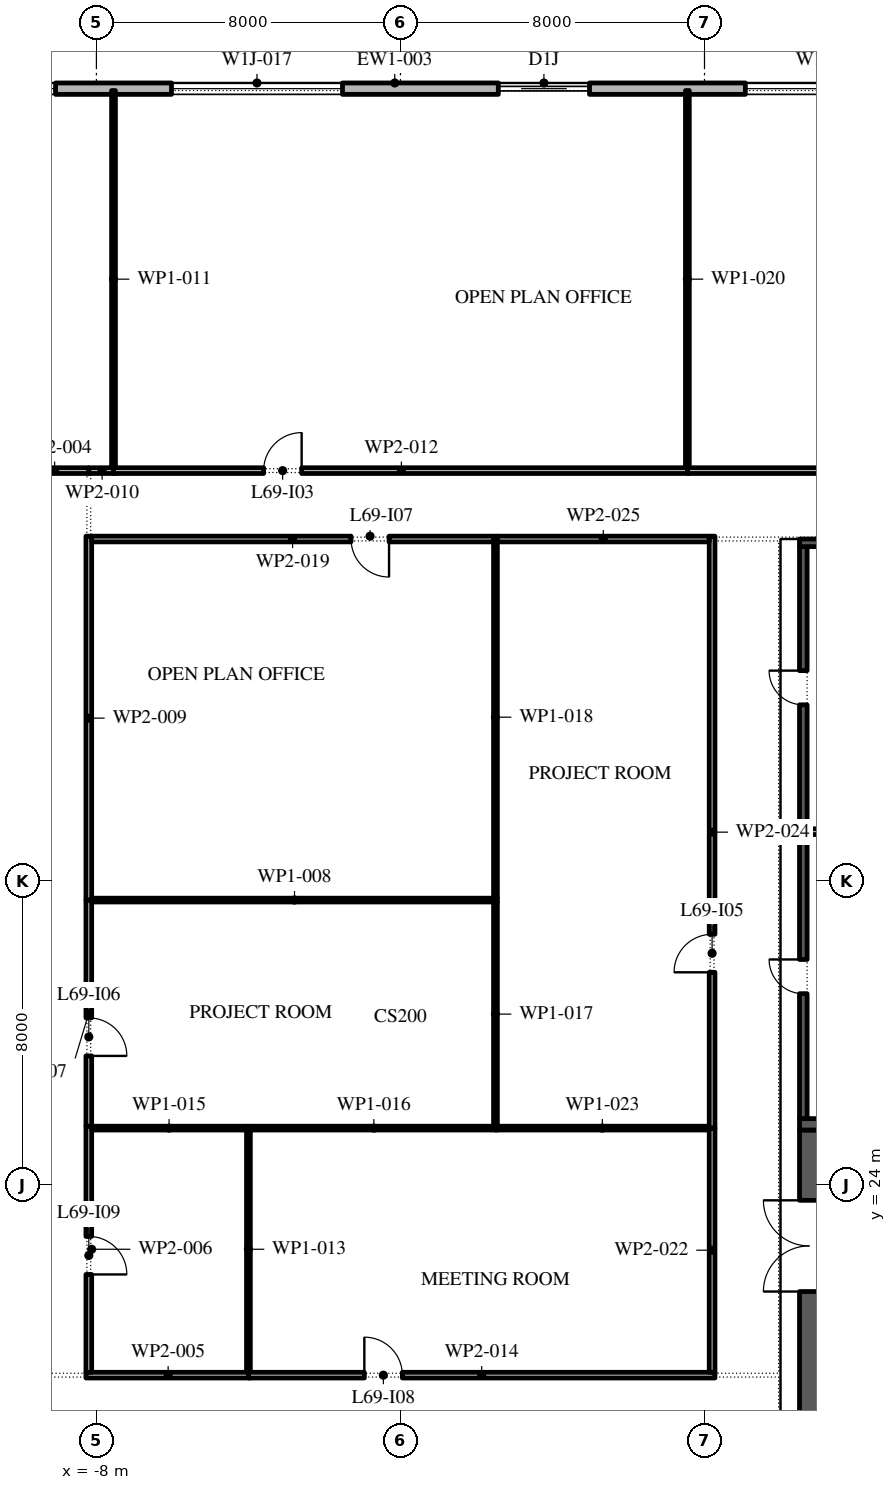
"""IFC4 building model, lengths in metres.
Left out: names, types, materials, properties, quantities, classifications, styles, units other than length and angle.
Written with IfcOpenShell. Run it as: python <this file> out.ifc"""

import sys

from ifc_helpers import new_model, si_unit, direction, frame, frame_2d, origin, place, context, subcontext, project, spatial, rectangle, extrude, element, fill, save


model = new_model("IFC4")
c1 = context("Model", 3, precision=1e-05, world=origin(), true_north=direction((0.0, 1.0)))
c2 = subcontext(c1, "Body", "Model", "MODEL_VIEW")
j1 = project(units=[si_unit("LENGTHUNIT", "METRE"), si_unit("PLANEANGLEUNIT", "RADIAN")], contexts=[c1])
p1 = place(None, origin())
s1 = spatial("IfcSite", under=j1, at=p1, CompositionType="ELEMENT")
p2 = place(p1, origin())
s2 = spatial("IfcBuilding", under=s1, at=p2, CompositionType="ELEMENT")
p3 = place(p2, frame((0.0, 0.0, 317.4)))
s3 = spatial("IfcBuildingStorey", under=s2, at=p3, CompositionType="ELEMENT", Elevation=317.4)
p4 = place(p3, frame((22.35, 52.85, 0.0), z_axis=(0.0, 0.0, 1.0), x_axis=(-1.0, 0.0, 0.0)))
e1 = element("IfcWall", 1, at=p4, inside=s3, PredefinedType="STANDARD", context=c2, shape_type="SweptSolid", body=[
    extrude(rectangle(XDim=45.0, YDim=0.3, at=frame_2d((22.5, 0.0))), origin(), (0.0, 0.0, 1.0), 4.0),
])
p5 = place(p4, frame((1.375, 0.0, 0.45)))
e2 = element("IfcOpeningElement", 2, at=p5, cuts=e1, PredefinedType="OPENING", context=c2, shape_type="SweptSolid", body=[
    extrude(rectangle(XDim=4.5, YDim=2.675, at=frame_2d((2.25, 1.337))), frame((0.0, 0.16, 0.0), z_axis=(0.0, -1.0, 0.0), x_axis=(1.0, 0.0, 0.0)), (0.0, 0.0, 1.0), 0.32),
])
p6 = place(p4, frame((8.775, 0.0, 0.45)))
e3 = element("IfcOpeningElement", 3, at=p6, cuts=e1, PredefinedType="OPENING", context=c2, shape_type="SweptSolid", body=[
    extrude(rectangle(XDim=4.5, YDim=2.675, at=frame_2d((2.25, 1.337))), frame((0.0, 0.16, 0.0), z_axis=(0.0, -1.0, 0.0), x_axis=(1.0, 0.0, 0.0)), (0.0, 0.0, 1.0), 0.32),
])
p7 = place(p4, frame((17.375, 0.0, 0.0)))
e4 = element("IfcOpeningElement", 4, at=p7, cuts=e1, PredefinedType="OPENING", context=c2, shape_type="SweptSolid", body=[
    extrude(rectangle(XDim=2.4, YDim=3.125, at=frame_2d((1.2, 1.562))), frame((0.0, 0.16, 0.0), z_axis=(0.0, -1.0, 0.0), x_axis=(1.0, 0.0, 0.0)), (0.0, 0.0, 1.0), 0.32),
])
p8 = place(p4, frame((23.875, 0.0, 0.45)))
e5 = element("IfcOpeningElement", 5, at=p8, cuts=e1, PredefinedType="OPENING", context=c2, shape_type="SweptSolid", body=[
    extrude(rectangle(XDim=4.5, YDim=2.675, at=frame_2d((2.25, 1.337))), frame((0.0, 0.16, 0.0), z_axis=(0.0, -1.0, 0.0), x_axis=(1.0, 0.0, 0.0)), (0.0, 0.0, 1.0), 0.32),
])
p9 = place(p4, frame((31.425, 0.0, 0.45)))
e6 = element("IfcOpeningElement", 6, at=p9, cuts=e1, PredefinedType="OPENING", context=c2, shape_type="SweptSolid", body=[
    extrude(rectangle(XDim=4.5, YDim=2.675, at=frame_2d((2.25, 1.337))), frame((0.0, 0.16, 0.0), z_axis=(0.0, -1.0, 0.0), x_axis=(1.0, 0.0, 0.0)), (0.0, 0.0, 1.0), 0.32),
])
p10 = place(p4, frame((38.975, 0.0, 0.45)))
e7 = element("IfcOpeningElement", 7, at=p10, cuts=e1, PredefinedType="OPENING", context=c2, shape_type="SweptSolid", body=[
    extrude(rectangle(XDim=4.5, YDim=2.675, at=frame_2d((2.25, 1.337))), frame((0.0, 0.16, 0.0), z_axis=(0.0, -1.0, 0.0), x_axis=(1.0, 0.0, 0.0)), (0.0, 0.0, 1.0), 0.32),
])
p11 = place(p3, frame((10.75, -2.45, 0.0), z_axis=(0.0, 0.0, 1.0), x_axis=(0.0, 1.0, 0.0)))
e8 = element("IfcWall", 8, at=p11, inside=s3, PredefinedType="SHEAR", context=c2, shape_type="SweptSolid", body=[
    extrude(rectangle(XDim=27.9, YDim=0.5, at=frame_2d((13.95, 0.0))), origin(), (0.0, 0.0, 1.0), 4.0),
])
p12 = place(p11, frame((23.65, 0.0, 0.0)))
e9 = element("IfcOpeningElement", 9, at=p12, cuts=e8, PredefinedType="OPENING", context=c2, shape_type="SweptSolid", body=[
    extrude(rectangle(XDim=2.4, YDim=2.1, at=frame_2d((1.2, 1.05))), frame((0.0, 0.26, 0.0), z_axis=(0.0, -1.0, 0.0), x_axis=(1.0, 0.0, 0.0)), (0.0, 0.0, 1.0), 0.52),
])
p13 = place(p11, frame((1.087, 0.0, 0.0)))
e10 = element("IfcOpeningElement", 10, at=p13, cuts=e8, PredefinedType="OPENING", context=c2, shape_type="SweptSolid", body=[
    extrude(rectangle(XDim=0.9, YDim=2.1, at=frame_2d((0.45, 1.05))), frame((0.0, 0.26, 0.0), z_axis=(0.0, -1.0, 0.0), x_axis=(1.0, 0.0, 0.0)), (0.0, 0.0, 1.0), 0.52),
])
p14 = place(p11, frame((4.262, 0.0, 0.0)))
e11 = element("IfcOpeningElement", 11, at=p14, cuts=e8, PredefinedType="OPENING", context=c2, shape_type="SweptSolid", body=[
    extrude(rectangle(XDim=1.0, YDim=2.1, at=frame_2d((0.5, 1.05))), frame((0.0, 0.26, 0.0), z_axis=(0.0, -1.0, 0.0), x_axis=(1.0, 0.0, 0.0)), (0.0, 0.0, 1.0), 0.52),
])
p15 = place(p3, frame((10.5, 25.6, 0.0), z_axis=(0.0, 0.0, 1.0), x_axis=(1.0, 0.0, 0.0)))
e12 = element("IfcWall", 12, at=p15, inside=s3, PredefinedType="SHEAR", context=c2, shape_type="SweptSolid", body=[
    extrude(rectangle(XDim=11.0, YDim=0.3, at=frame_2d((5.5, 0.0))), origin(), (0.0, 0.0, 1.0), 4.0),
])
p16 = place(p3, frame((10.6, 25.75, 0.0), z_axis=(0.0, 0.0, 1.0), x_axis=(0.0, 1.0, 0.0)))
e13 = element("IfcWall", 13, at=p16, inside=s3, PredefinedType="SHEAR", context=c2, shape_type="SweptSolid", body=[
    extrude(rectangle(XDim=15.05, YDim=0.2, at=frame_2d((7.525, 0.0))), origin(), (0.0, 0.0, 1.0), 4.0),
])
p17 = place(p16, frame((3.288, 0.0, 0.0)))
e14 = element("IfcOpeningElement", 14, at=p17, cuts=e13, PredefinedType="OPENING", context=c2, shape_type="SweptSolid", body=[
    extrude(rectangle(XDim=0.9, YDim=2.1, at=frame_2d((0.45, 1.05))), frame((0.0, 0.11, 0.0), z_axis=(0.0, -1.0, 0.0), x_axis=(1.0, 0.0, 0.0)), (0.0, 0.0, 1.0), 0.22),
])
p18 = place(p16, frame((10.887, 0.0, 0.0)))
e15 = element("IfcOpeningElement", 15, at=p18, cuts=e13, PredefinedType="OPENING", context=c2, shape_type="SweptSolid", body=[
    extrude(rectangle(XDim=0.9, YDim=2.1, at=frame_2d((0.45, 1.05))), frame((0.0, 0.11, 0.0), z_axis=(0.0, -1.0, 0.0), x_axis=(1.0, 0.0, 0.0)), (0.0, 0.0, 1.0), 0.22),
])
p19 = place(p3, frame((10.5, 40.9, 0.0), z_axis=(0.0, 0.0, 1.0), x_axis=(1.0, 0.0, 0.0)))
e16 = element("IfcWall", 16, at=p19, inside=s3, PredefinedType="SHEAR", context=c2, shape_type="SweptSolid", body=[
    extrude(rectangle(XDim=11.0, YDim=0.2, at=frame_2d((5.5, 0.0))), origin(), (0.0, 0.0, 1.0), 4.0),
])
p20 = place(p3, frame((10.7, 33.3, 0.0), z_axis=(0.0, 0.0, 1.0), x_axis=(1.0, 0.0, 0.0)))
e17 = element("IfcWall", 17, at=p20, inside=s3, PredefinedType="PARTITIONING", context=c2, shape_type="SweptSolid", body=[
    extrude(rectangle(XDim=5.3, YDim=0.15, at=frame_2d((2.65, 0.0))), origin(), (0.0, 0.0, 1.0), 4.0),
])
p21 = place(p3, frame((-10.0, 42.8, 0.0), z_axis=(0.0, 0.0, 1.0), x_axis=(1.0, 0.0, 0.0)))
e18 = element("IfcWall", 18, at=p21, inside=s3, PredefinedType="PARTITIONING", context=c2, shape_type="SweptSolid", body=[
    extrude(rectangle(XDim=1.8, YDim=0.15, at=frame_2d((0.9, 0.0))), origin(), (0.0, 0.0, 1.0), 4.0),
])
p22 = place(p3, frame((-8.275, 19.0, 0.0), z_axis=(0.0, 0.0, 1.0), x_axis=(1.0, 0.0, 0.0)))
e19 = element("IfcWall", 19, at=p22, inside=s3, PredefinedType="PARTITIONING", context=c2, shape_type="SweptSolid", body=[
    extrude(rectangle(XDim=4.325, YDim=0.15, at=frame_2d((2.163, 0.0))), origin(), (0.0, 0.0, 1.0), 4.0),
])
p23 = place(p3, frame((-8.2, 25.55, 0.0), z_axis=(0.0, 0.0, 1.0), x_axis=(0.0, -1.0, 0.0)))
e20 = element("IfcWall", 20, at=p23, inside=s3, PredefinedType="PARTITIONING", context=c2, shape_type="SweptSolid", body=[
    extrude(rectangle(XDim=6.475, YDim=0.15, at=frame_2d((3.238, 0.0))), origin(), (0.0, 0.0, 1.0), 4.0),
])
p24 = place(p23, frame((2.9, 0.0, 0.0)))
e21 = element("IfcOpeningElement", 21, at=p24, cuts=e20, PredefinedType="OPENING", context=c2, shape_type="SweptSolid", body=[
    extrude(rectangle(XDim=1.0, YDim=2.1, at=frame_2d((0.5, 1.05))), frame((0.0, 0.085, 0.0), z_axis=(0.0, -1.0, 0.0), x_axis=(1.0, 0.0, 0.0)), (0.0, 0.0, 1.0), 0.17),
])
p25 = place(p3, frame((-8.2, 31.5, 0.0), z_axis=(0.0, 0.0, 1.0), x_axis=(0.0, -1.0, 0.0)))
e22 = element("IfcWall", 22, at=p25, inside=s3, PredefinedType="PARTITIONING", context=c2, shape_type="SweptSolid", body=[
    extrude(rectangle(XDim=5.95, YDim=0.15, at=frame_2d((2.975, 0.0))), origin(), (0.0, 0.0, 1.0), 4.0),
])
p26 = place(p25, frame((3.1, 0.0, 0.0)))
e23 = element("IfcOpeningElement", 23, at=p26, cuts=e22, PredefinedType="OPENING", context=c2, shape_type="SweptSolid", body=[
    extrude(rectangle(XDim=1.0, YDim=2.1, at=frame_2d((0.5, 1.05))), frame((0.0, 0.085, 0.0), z_axis=(0.0, -1.0, 0.0), x_axis=(1.0, 0.0, 0.0)), (0.0, 0.0, 1.0), 0.17),
])
p27 = place(p3, frame((-8.125, 31.5, 0.0), z_axis=(0.0, 0.0, 1.0), x_axis=(1.0, 0.0, 0.0)))
e24 = element("IfcWall", 24, at=p27, inside=s3, PredefinedType="PARTITIONING", context=c2, shape_type="SweptSolid", body=[
    extrude(rectangle(XDim=10.675, YDim=0.1, at=frame_2d((5.337, 0.0))), origin(), (0.0, 0.0, 1.0), 4.0),
])
p28 = place(p3, frame((-8.2, 41.075, 0.0), z_axis=(0.0, 0.0, 1.0), x_axis=(0.0, -1.0, 0.0)))
e25 = element("IfcWall", 25, at=p28, inside=s3, PredefinedType="PARTITIONING", context=c2, shape_type="SweptSolid", body=[
    extrude(rectangle(XDim=9.575, YDim=0.15, at=frame_2d((4.788, 0.0))), origin(), (0.0, 0.0, 1.0), 4.0),
])
p29 = place(p3, frame((-8.2, 42.8, 0.0), z_axis=(0.0, 0.0, 1.0), x_axis=(1.0, 0.0, 0.0)))
e26 = element("IfcWall", 26, at=p29, inside=s3, PredefinedType="PARTITIONING", context=c2, shape_type="SweptSolid", body=[
    extrude(rectangle(XDim=0.7, YDim=0.15, at=frame_2d((0.35, 0.0))), origin(), (0.0, 0.0, 1.0), 4.0),
])
p30 = place(p3, frame((-7.55, 42.875, 0.0), z_axis=(0.0, 0.0, 1.0), x_axis=(0.0, 1.0, 0.0)))
e27 = element("IfcWall", 27, at=p30, inside=s3, PredefinedType="PARTITIONING", context=c2, shape_type="SweptSolid", body=[
    extrude(rectangle(XDim=9.925, YDim=0.1, at=frame_2d((4.962, 0.0))), origin(), (0.0, 0.0, 1.0), 4.0),
])
p31 = place(p3, frame((-7.55, 42.8, 0.0), z_axis=(0.0, 0.0, 1.0), x_axis=(1.0, 0.0, 0.0)))
e28 = element("IfcWall", 28, at=p31, inside=s3, PredefinedType="PARTITIONING", context=c2, shape_type="SweptSolid", body=[
    extrude(rectangle(XDim=15.15, YDim=0.15, at=frame_2d((7.575, 0.0))), origin(), (0.0, 0.0, 1.0), 4.0),
])
p32 = place(p31, frame((3.95, 0.0, 0.0)))
e29 = element("IfcOpeningElement", 29, at=p32, cuts=e28, PredefinedType="OPENING", context=c2, shape_type="SweptSolid", body=[
    extrude(rectangle(XDim=1.0, YDim=2.1, at=frame_2d((0.5, 1.05))), frame((0.0, 0.085, 0.0), z_axis=(0.0, -1.0, 0.0), x_axis=(1.0, 0.0, 0.0)), (0.0, 0.0, 1.0), 0.17),
])
p33 = place(p3, frame((-4.0, 19.075, 0.0), z_axis=(0.0, 0.0, 1.0), x_axis=(0.0, 1.0, 0.0)))
e30 = element("IfcWall", 30, at=p33, inside=s3, PredefinedType="PARTITIONING", context=c2, shape_type="SweptSolid", body=[
    extrude(rectangle(XDim=6.475, YDim=0.1, at=frame_2d((3.238, 0.0))), origin(), (0.0, 0.0, 1.0), 4.0),
])
p34 = place(p3, frame((-4.0, 19.0, 0.0), z_axis=(0.0, 0.0, 1.0), x_axis=(1.0, 0.0, 0.0)))
e31 = element("IfcWall", 31, at=p34, inside=s3, PredefinedType="PARTITIONING", context=c2, shape_type="SweptSolid", body=[
    extrude(rectangle(XDim=12.275, YDim=0.15, at=frame_2d((6.137, 0.0))), origin(), (0.0, 0.0, 1.0), 4.0),
])
p35 = place(p34, frame((3.05, 0.0, 0.0)))
e32 = element("IfcOpeningElement", 32, at=p35, cuts=e31, PredefinedType="OPENING", context=c2, shape_type="SweptSolid", body=[
    extrude(rectangle(XDim=1.0, YDim=2.1, at=frame_2d((0.5, 1.05))), frame((0.0, 0.085, 0.0), z_axis=(0.0, -1.0, 0.0), x_axis=(1.0, 0.0, 0.0)), (0.0, 0.0, 1.0), 0.17),
])
p36 = place(p3, frame((-4.05, 25.5, 0.0), z_axis=(0.0, 0.0, 1.0), x_axis=(-1.0, 0.0, 0.0)))
e33 = element("IfcWall", 33, at=p36, inside=s3, PredefinedType="PARTITIONING", context=c2, shape_type="SweptSolid", body=[
    extrude(rectangle(XDim=4.075, YDim=0.1, at=frame_2d((2.038, 0.0))), origin(), (0.0, 0.0, 1.0), 4.0),
])
p37 = place(p3, frame((2.55, 25.5, 0.0), z_axis=(0.0, 0.0, 1.0), x_axis=(-1.0, 0.0, 0.0)))
e34 = element("IfcWall", 34, at=p37, inside=s3, PredefinedType="PARTITIONING", context=c2, shape_type="SweptSolid", body=[
    extrude(rectangle(XDim=6.5, YDim=0.1, at=frame_2d((3.25, 0.0))), origin(), (0.0, 0.0, 1.0), 4.0),
])
p38 = place(p3, frame((2.5, 25.55, 0.0), z_axis=(0.0, 0.0, 1.0), x_axis=(0.0, 1.0, 0.0)))
e35 = element("IfcWall", 35, at=p38, inside=s3, PredefinedType="PARTITIONING", context=c2, shape_type="SweptSolid", body=[
    extrude(rectangle(XDim=5.9, YDim=0.1, at=frame_2d((2.95, 0.0))), origin(), (0.0, 0.0, 1.0), 4.0),
])
p39 = place(p3, frame((2.5, 31.55, 0.0), z_axis=(0.0, 0.0, 1.0), x_axis=(0.0, 1.0, 0.0)))
e36 = element("IfcWall", 36, at=p39, inside=s3, PredefinedType="PARTITIONING", context=c2, shape_type="SweptSolid", body=[
    extrude(rectangle(XDim=9.525, YDim=0.1, at=frame_2d((4.762, 0.0))), origin(), (0.0, 0.0, 1.0), 4.0),
])
p40 = place(p3, frame((2.45, 41.0, 0.0), z_axis=(0.0, 0.0, 1.0), x_axis=(-1.0, 0.0, 0.0)))
e37 = element("IfcWall", 37, at=p40, inside=s3, PredefinedType="PARTITIONING", context=c2, shape_type="SweptSolid", body=[
    extrude(rectangle(XDim=10.575, YDim=0.15, at=frame_2d((5.288, 0.0))), origin(), (0.0, 0.0, 1.0), 4.0),
])
p41 = place(p40, frame((2.75, 0.0, 0.0)))
e38 = element("IfcOpeningElement", 38, at=p41, cuts=e37, PredefinedType="OPENING", context=c2, shape_type="SweptSolid", body=[
    extrude(rectangle(XDim=1.0, YDim=2.1, at=frame_2d((0.5, 1.05))), frame((0.0, 0.085, 0.0), z_axis=(0.0, -1.0, 0.0), x_axis=(1.0, 0.0, 0.0)), (0.0, 0.0, 1.0), 0.17),
])
p42 = place(p3, frame((7.55, 42.875, 0.0), z_axis=(0.0, 0.0, 1.0), x_axis=(0.0, 1.0, 0.0)))
e39 = element("IfcWall", 39, at=p42, inside=s3, PredefinedType="PARTITIONING", context=c2, shape_type="SweptSolid", body=[
    extrude(rectangle(XDim=9.925, YDim=0.1, at=frame_2d((4.962, 0.0))), origin(), (0.0, 0.0, 1.0), 4.0),
])
p43 = place(p3, frame((7.55, 42.8, 0.0), z_axis=(0.0, 0.0, 1.0), x_axis=(1.0, 0.0, 0.0)))
e40 = element("IfcWall", 40, at=p43, inside=s3, PredefinedType="PARTITIONING", context=c2, shape_type="SweptSolid", body=[
    extrude(rectangle(XDim=15.15, YDim=0.15, at=frame_2d((7.575, 0.0))), origin(), (0.0, 0.0, 1.0), 4.0),
])
p44 = place(p43, frame((8.45, 0.0, 0.0)))
e41 = element("IfcOpeningElement", 41, at=p44, cuts=e40, PredefinedType="OPENING", context=c2, shape_type="SweptSolid", body=[
    extrude(rectangle(XDim=1.0, YDim=2.1, at=frame_2d((0.5, 1.05))), frame((0.0, 0.085, 0.0), z_axis=(0.0, -1.0, 0.0), x_axis=(1.0, 0.0, 0.0)), (0.0, 0.0, 1.0), 0.17),
])
p45 = place(p3, frame((8.2, 19.075, 0.0), z_axis=(0.0, 0.0, 1.0), x_axis=(0.0, 1.0, 0.0)))
e42 = element("IfcWall", 42, at=p45, inside=s3, PredefinedType="PARTITIONING", context=c2, shape_type="SweptSolid", body=[
    extrude(rectangle(XDim=6.425, YDim=0.15, at=frame_2d((3.212, 0.0))), origin(), (0.0, 0.0, 1.0), 4.0),
])
p46 = place(p3, frame((8.125, 25.5, 0.0), z_axis=(0.0, 0.0, 1.0), x_axis=(-1.0, 0.0, 0.0)))
e43 = element("IfcWall", 43, at=p46, inside=s3, PredefinedType="PARTITIONING", context=c2, shape_type="SweptSolid", body=[
    extrude(rectangle(XDim=5.625, YDim=0.1, at=frame_2d((2.812, 0.0))), origin(), (0.0, 0.0, 1.0), 4.0),
])
p47 = place(p3, frame((8.2, 25.5, 0.0), z_axis=(0.0, 0.0, 1.0), x_axis=(0.0, 1.0, 0.0)))
e44 = element("IfcWall", 44, at=p47, inside=s3, PredefinedType="PARTITIONING", context=c2, shape_type="SweptSolid", body=[
    extrude(rectangle(XDim=15.575, YDim=0.15, at=frame_2d((7.788, 0.0))), origin(), (0.0, 0.0, 1.0), 4.0),
])
p48 = place(p47, frame((4.1, 0.0, 0.0)))
e45 = element("IfcOpeningElement", 45, at=p48, cuts=e44, PredefinedType="OPENING", context=c2, shape_type="SweptSolid", body=[
    extrude(rectangle(XDim=1.0, YDim=2.1, at=frame_2d((0.5, 1.05))), frame((0.0, 0.085, 0.0), z_axis=(0.0, -1.0, 0.0), x_axis=(1.0, 0.0, 0.0)), (0.0, 0.0, 1.0), 0.17),
])
p49 = place(p3, frame((8.125, 41.0, 0.0), z_axis=(0.0, 0.0, 1.0), x_axis=(-1.0, 0.0, 0.0)))
e46 = element("IfcWall", 46, at=p49, inside=s3, PredefinedType="PARTITIONING", context=c2, shape_type="SweptSolid", body=[
    extrude(rectangle(XDim=5.575, YDim=0.15, at=frame_2d((2.788, 0.0))), origin(), (0.0, 0.0, 1.0), 4.0),
])
p50 = place(p6, origin())
e47 = element("IfcWindow", 47, at=p50, inside=s3, PartitioningType="DOUBLE_PANEL_VERTICAL", PredefinedType="WINDOW", context=c2, shape_type="SweptSolid", body=[
    extrude(rectangle(XDim=4.5, YDim=2.675, at=frame_2d((2.25, 1.337))), frame((0.0, 0.03, 0.0), z_axis=(0.0, -1.0, 0.0), x_axis=(1.0, 0.0, 0.0)), (0.0, 0.0, 1.0), 0.06),
])
fill(e3, e47)
p51 = place(p7, origin())
e48 = element("IfcDoor", 48, at=p51, inside=s3, OperationType="DOUBLE_DOOR_SLIDING", PredefinedType="DOOR", context=c2, shape_type="SweptSolid", body=[
    extrude(rectangle(XDim=2.4, YDim=3.125, at=frame_2d((1.2, 1.562))), frame((0.0, 0.025, 0.0), z_axis=(0.0, -1.0, 0.0), x_axis=(1.0, 0.0, 0.0)), (0.0, 0.0, 1.0), 0.05),
])
fill(e4, e48)
p52 = place(p8, origin())
e49 = element("IfcWindow", 49, at=p52, inside=s3, PartitioningType="DOUBLE_PANEL_VERTICAL", PredefinedType="WINDOW", context=c2, shape_type="SweptSolid", body=[
    extrude(rectangle(XDim=4.5, YDim=2.675, at=frame_2d((2.25, 1.337))), frame((0.0, 0.03, 0.0), z_axis=(0.0, -1.0, 0.0), x_axis=(1.0, 0.0, 0.0)), (0.0, 0.0, 1.0), 0.06),
])
fill(e5, e49)
p53 = place(p9, origin())
e50 = element("IfcWindow", 50, at=p53, inside=s3, PartitioningType="DOUBLE_PANEL_VERTICAL", PredefinedType="WINDOW", context=c2, shape_type="SweptSolid", body=[
    extrude(rectangle(XDim=4.5, YDim=2.675, at=frame_2d((2.25, 1.337))), frame((0.0, 0.03, 0.0), z_axis=(0.0, -1.0, 0.0), x_axis=(1.0, 0.0, 0.0)), (0.0, 0.0, 1.0), 0.06),
])
fill(e6, e50)
p54 = place(p12, origin())
e51 = element("IfcDoor", 51, at=p54, inside=s3, OperationType="DOUBLE_DOOR_SINGLE_SWING", PredefinedType="DOOR", context=c2, shape_type="SweptSolid", body=[
    extrude(rectangle(XDim=2.4, YDim=2.1, at=frame_2d((1.2, 1.05))), frame((0.0, 0.025, 0.0), z_axis=(0.0, -1.0, 0.0), x_axis=(1.0, 0.0, 0.0)), (0.0, 0.0, 1.0), 0.05),
])
fill(e9, e51)
p55 = place(p17, origin())
e52 = element("IfcDoor", 52, at=p55, inside=s3, OperationType="SINGLE_SWING_LEFT", PredefinedType="DOOR", context=c2, shape_type="SweptSolid", body=[
    extrude(rectangle(XDim=0.9, YDim=2.1, at=frame_2d((0.45, 1.05))), frame((0.0, -0.05, 0.0), z_axis=(0.0, -1.0, 0.0), x_axis=(1.0, 0.0, 0.0)), (0.0, 0.0, 1.0), 0.05),
])
fill(e14, e52)
p56 = place(p18, origin())
e53 = element("IfcDoor", 53, at=p56, inside=s3, OperationType="SINGLE_SWING_LEFT", PredefinedType="DOOR", context=c2, shape_type="SweptSolid", body=[
    extrude(rectangle(XDim=0.9, YDim=2.1, at=frame_2d((0.45, 1.05))), frame((0.0, -0.05, 0.0), z_axis=(0.0, -1.0, 0.0), x_axis=(1.0, 0.0, 0.0)), (0.0, 0.0, 1.0), 0.05),
])
fill(e15, e53)
p57 = place(p32, origin())
e54 = element("IfcDoor", 54, at=p57, inside=s3, OperationType="SINGLE_SWING_LEFT", PredefinedType="DOOR", context=c2, shape_type="SweptSolid", body=[
    extrude(rectangle(XDim=1.0, YDim=2.1, at=frame_2d((0.5, 1.05))), frame((0.0, 0.025, 0.0), z_axis=(0.0, -1.0, 0.0), x_axis=(1.0, 0.0, 0.0)), (0.0, 0.0, 1.0), 0.05),
])
fill(e29, e54)
p58 = place(p48, origin())
e55 = element("IfcDoor", 55, at=p58, inside=s3, OperationType="SINGLE_SWING_RIGHT", PredefinedType="DOOR", context=c2, shape_type="SweptSolid", body=[
    extrude(rectangle(XDim=1.0, YDim=2.1, at=frame_2d((0.5, 1.05))), frame((0.0, 0.025, 0.0), z_axis=(0.0, -1.0, 0.0), x_axis=(1.0, 0.0, 0.0)), (0.0, 0.0, 1.0), 0.05),
])
fill(e45, e55)
p59 = place(p26, origin())
e56 = element("IfcDoor", 56, at=p59, inside=s3, OperationType="SINGLE_SWING_LEFT", PredefinedType="DOOR", context=c2, shape_type="SweptSolid", body=[
    extrude(rectangle(XDim=1.0, YDim=2.1, at=frame_2d((0.5, 1.05))), frame((0.0, 0.025, 0.0), z_axis=(0.0, -1.0, 0.0), x_axis=(1.0, 0.0, 0.0)), (0.0, 0.0, 1.0), 0.05),
])
fill(e23, e56)
p60 = place(p41, origin())
e57 = element("IfcDoor", 57, at=p60, inside=s3, OperationType="SINGLE_SWING_RIGHT", PredefinedType="DOOR", context=c2, shape_type="SweptSolid", body=[
    extrude(rectangle(XDim=1.0, YDim=2.1, at=frame_2d((0.5, 1.05))), frame((0.0, 0.025, 0.0), z_axis=(0.0, -1.0, 0.0), x_axis=(1.0, 0.0, 0.0)), (0.0, 0.0, 1.0), 0.05),
])
fill(e38, e57)
p61 = place(p35, origin())
e58 = element("IfcDoor", 58, at=p61, inside=s3, OperationType="SINGLE_SWING_RIGHT", PredefinedType="DOOR", context=c2, shape_type="SweptSolid", body=[
    extrude(rectangle(XDim=1.0, YDim=2.1, at=frame_2d((0.5, 1.05))), frame((0.0, 0.025, 0.0), z_axis=(0.0, -1.0, 0.0), x_axis=(1.0, 0.0, 0.0)), (0.0, 0.0, 1.0), 0.05),
])
fill(e32, e58)
p62 = place(p24, origin())
e59 = element("IfcDoor", 59, at=p62, inside=s3, OperationType="SINGLE_SWING_LEFT", PredefinedType="DOOR", context=c2, shape_type="SweptSolid", body=[
    extrude(rectangle(XDim=1.0, YDim=2.1, at=frame_2d((0.5, 1.05))), frame((0.0, 0.025, 0.0), z_axis=(0.0, -1.0, 0.0), x_axis=(1.0, 0.0, 0.0)), (0.0, 0.0, 1.0), 0.05),
])
fill(e21, e59)
save(model, sys.argv[1])
